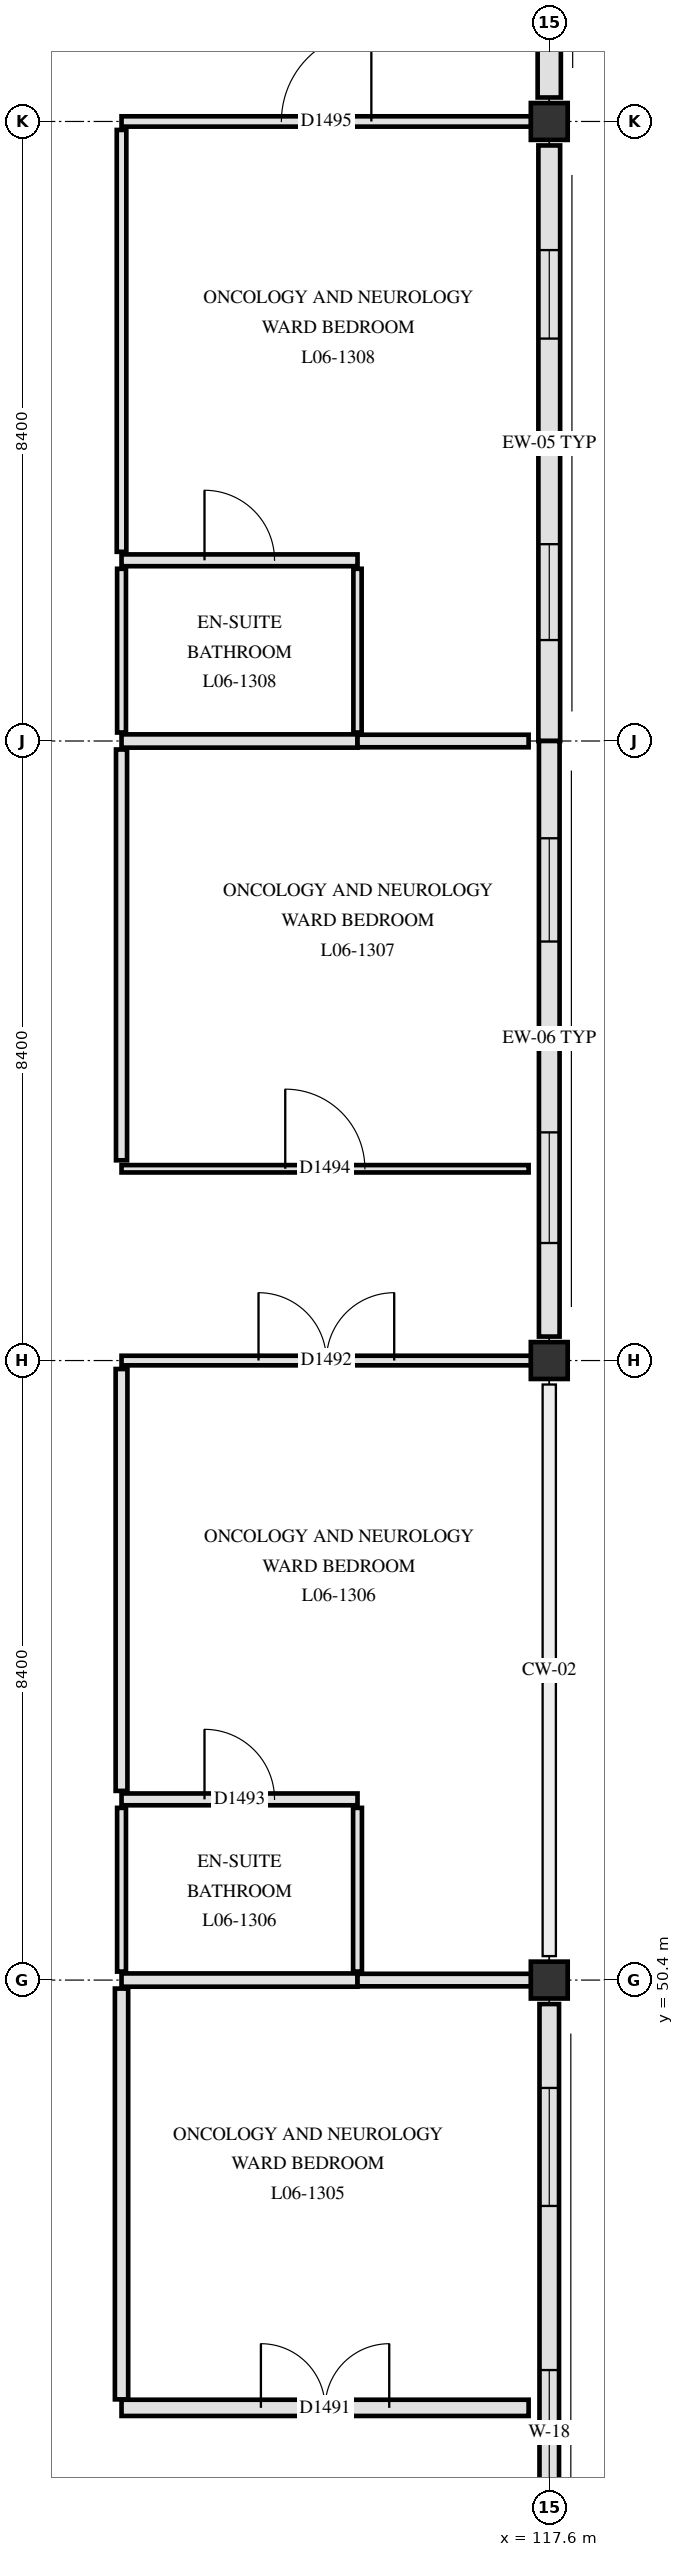
"""IFC4 building model, lengths in metres.
Left out: names, types, materials, properties, quantities, classifications, styles, units other than length and angle.
Written with IfcOpenShell. Run it as: python <this file> out.ifc"""

import sys

from ifc_helpers import new_model, si_unit, direction, frame, frame_2d, origin, origin_2d, place, context, subcontext, project, spatial, rectangle, extrude, element, fill, save


model = new_model("IFC4")
c1 = context("Model", 3, precision=1e-05, world=origin(), true_north=direction((0.0, 1.0)))
c2 = subcontext(c1, "Body", "Model", "MODEL_VIEW")
j1 = project(units=[si_unit("LENGTHUNIT", "METRE"), si_unit("PLANEANGLEUNIT", "RADIAN")], contexts=[c1])
p1 = place(None, origin())
s1 = spatial("IfcSite", under=j1, at=p1, CompositionType="ELEMENT")
p2 = place(p1, origin())
s2 = spatial("IfcBuilding", under=s1, at=p2, CompositionType="ELEMENT")
p3 = place(p2, frame((0.0, 0.0, 26.4)))
s3 = spatial("IfcBuildingStorey", under=s2, at=p3, CompositionType="ELEMENT", Elevation=26.4)
for number, where, z_axis, x_axis in (
    (1, (117.6, 50.4, 0.0), (0.0, 0.0, 1.0), (1.0, 0.0, 0.0)),
    (2, (117.6, 58.8, 0.0), (0.0, 0.0, 1.0), (1.0, 0.0, 0.0)),
    (3, (117.6, 75.6, 0.0), (0.0, 0.0, 1.0), (1.0, 0.0, 0.0)),
):
    element("IfcColumn", number, at=place(p3, frame(where, z_axis=z_axis, x_axis=x_axis)), inside=s3, PredefinedType="COLUMN", context=c2, shape_type="SweptSolid", body=[
        extrude(rectangle(XDim=0.5, YDim=0.5, at=origin_2d()), origin(), (0.0, 0.0, 1.0), 3.9),
    ])
p4 = place(p3, frame((117.6, 83.675, 0.0), z_axis=(0.0, 0.0, 1.0), x_axis=(0.0, -1.0, 0.0)))
e4 = element("IfcWall", 4, at=p4, inside=s3, PredefinedType="SOLIDWALL", context=c2, shape_type="SweptSolid", body=[
    extrude(rectangle(XDim=7.75, YDim=0.315, at=frame_2d((3.875, 0.0))), origin(), (0.0, 0.0, 1.0), 3.34),
])
p5 = place(p4, frame((1.438, 0.0, 0.85)))
e5 = element("IfcOpeningElement", 5, at=p5, cuts=e4, PredefinedType="OPENING", context=c2, shape_type="SweptSolid", body=[
    extrude(rectangle(XDim=1.0, YDim=1.42, at=frame_2d((0.5, 0.71))), frame((0.0, 0.167, 0.0), z_axis=(0.0, -1.0, 0.0), x_axis=(1.0, 0.0, 0.0)), (0.0, 0.0, 1.0), 0.335),
])
p6 = place(p4, frame((5.262, 0.0, 0.85)))
e6 = element("IfcOpeningElement", 6, at=p6, cuts=e4, PredefinedType="OPENING", context=c2, shape_type="SweptSolid", body=[
    extrude(rectangle(XDim=1.1, YDim=1.42, at=frame_2d((0.55, 0.71))), frame((0.0, 0.167, 0.0), z_axis=(0.0, -1.0, 0.0), x_axis=(1.0, 0.0, 0.0)), (0.0, 0.0, 1.0), 0.335),
])
p7 = place(p3, frame((117.6, 75.275, 0.0), z_axis=(0.0, 0.0, 1.0), x_axis=(0.0, -1.0, 0.0)))
e7 = element("IfcWall", 7, at=p7, inside=s3, PredefinedType="SOLIDWALL", context=c2, shape_type="SweptSolid", body=[
    extrude(rectangle(XDim=8.075, YDim=0.295, at=frame_2d((4.038, 0.0))), origin(), (0.0, 0.0, 1.0), 3.11),
])
p8 = place(p7, frame((1.419, 0.0, 0.85)))
e8 = element("IfcOpeningElement", 8, at=p8, cuts=e7, PredefinedType="OPENING", context=c2, shape_type="SweptSolid", body=[
    extrude(rectangle(XDim=1.2, YDim=1.42, at=frame_2d((0.6, 0.71))), frame((0.0, 0.157, 0.0), z_axis=(0.0, -1.0, 0.0), x_axis=(1.0, 0.0, 0.0)), (0.0, 0.0, 1.0), 0.315),
])
p9 = place(p7, frame((5.406, 0.0, 0.85)))
e9 = element("IfcOpeningElement", 9, at=p9, cuts=e7, PredefinedType="OPENING", context=c2, shape_type="SweptSolid", body=[
    extrude(rectangle(XDim=1.3, YDim=1.42, at=frame_2d((0.65, 0.71))), frame((0.0, 0.157, 0.0), z_axis=(0.0, -1.0, 0.0), x_axis=(1.0, 0.0, 0.0)), (0.0, 0.0, 1.0), 0.315),
])
p10 = place(p3, frame((117.6, 67.2, 0.0), z_axis=(0.0, 0.0, 1.0), x_axis=(0.0, -1.0, 0.0)))
e10 = element("IfcWall", 10, at=p10, inside=s3, PredefinedType="SOLIDWALL", context=c2, shape_type="SweptSolid", body=[
    extrude(rectangle(XDim=8.075, YDim=0.28, at=frame_2d((4.038, 0.0))), origin(), (0.0, 0.0, 1.0), 3.11),
])
p11 = place(p10, frame((1.319, 0.0, 0.85)))
e11 = element("IfcOpeningElement", 11, at=p11, cuts=e10, PredefinedType="OPENING", context=c2, shape_type="SweptSolid", body=[
    extrude(rectangle(XDim=1.4, YDim=1.42, at=frame_2d((0.7, 0.71))), frame((0.0, 0.15, 0.0), z_axis=(0.0, -1.0, 0.0), x_axis=(1.0, 0.0, 0.0)), (0.0, 0.0, 1.0), 0.3),
])
p12 = place(p10, frame((5.306, 0.0, 0.85)))
e12 = element("IfcOpeningElement", 12, at=p12, cuts=e10, PredefinedType="OPENING", context=c2, shape_type="SweptSolid", body=[
    extrude(rectangle(XDim=1.5, YDim=1.42, at=frame_2d((0.75, 0.71))), frame((0.0, 0.15, 0.0), z_axis=(0.0, -1.0, 0.0), x_axis=(1.0, 0.0, 0.0)), (0.0, 0.0, 1.0), 0.3),
])
p13 = place(p3, frame((117.6, 50.075, 0.0), z_axis=(0.0, 0.0, 1.0), x_axis=(0.0, -1.0, 0.0)))
e13 = element("IfcWall", 13, at=p13, inside=s3, PredefinedType="SOLIDWALL", context=c2, shape_type="SweptSolid", body=[
    extrude(rectangle(XDim=7.75, YDim=0.265, at=frame_2d((3.875, 0.0))), origin(), (0.0, 0.0, 1.0), 3.38),
])
p14 = place(p13, frame((1.137, 0.0, 0.85)))
e14 = element("IfcOpeningElement", 14, at=p14, cuts=e13, PredefinedType="OPENING", context=c2, shape_type="SweptSolid", body=[
    extrude(rectangle(XDim=1.6, YDim=1.42, at=frame_2d((0.8, 0.71))), frame((0.0, 0.142, 0.0), z_axis=(0.0, -1.0, 0.0), x_axis=(1.0, 0.0, 0.0)), (0.0, 0.0, 1.0), 0.285),
])
p15 = place(p13, frame((4.962, 0.0, 0.85)))
e15 = element("IfcOpeningElement", 15, at=p15, cuts=e13, PredefinedType="OPENING", context=c2, shape_type="SweptSolid", body=[
    extrude(rectangle(XDim=1.7, YDim=1.42, at=frame_2d((0.85, 0.71))), frame((0.0, 0.142, 0.0), z_axis=(0.0, -1.0, 0.0), x_axis=(1.0, 0.0, 0.0)), (0.0, 0.0, 1.0), 0.285),
])
p16 = place(p3, frame((111.8, 44.6, 0.0), z_axis=(0.0, 0.0, 1.0), x_axis=(1.0, 0.0, 0.0)))
e16 = element("IfcWall", 16, at=p16, inside=s3, PredefinedType="PARTITIONING", context=c2, shape_type="SweptSolid", body=[
    extrude(rectangle(XDim=5.52, YDim=0.22, at=frame_2d((2.76, 0.0))), origin(), (0.0, 0.0, 1.0), 3.34),
])
p17 = place(p16, frame((1.89, 0.0, 0.0)))
e17 = element("IfcOpeningElement", 17, at=p17, cuts=e16, PredefinedType="OPENING", context=c2, shape_type="SweptSolid", body=[
    extrude(rectangle(XDim=1.74, YDim=2.24, at=frame_2d((0.87, 1.12))), frame((0.0, 0.12, 0.0), z_axis=(0.0, -1.0, 0.0), x_axis=(1.0, 0.0, 0.0)), (0.0, 0.0, 1.0), 0.24),
])
p18 = place(p3, frame((111.8, 50.4, 0.0), z_axis=(0.0, 0.0, 1.0), x_axis=(1.0, 0.0, 0.0)))
e18 = element("IfcWall", 18, at=p18, inside=s3, PredefinedType="PARTITIONING", context=c2, shape_type="SweptSolid", body=[
    extrude(rectangle(XDim=3.2, YDim=0.18, at=frame_2d((1.6, 0.0))), origin(), (0.0, 0.0, 1.0), 3.21),
])
p19 = place(p3, frame((115.0, 50.4, 0.0), z_axis=(0.0, 0.0, 1.0), x_axis=(1.0, 0.0, 0.0)))
e19 = element("IfcWall", 19, at=p19, inside=s3, PredefinedType="PARTITIONING", context=c2, shape_type="SweptSolid", body=[
    extrude(rectangle(XDim=2.355, YDim=0.17, at=frame_2d((1.177, 0.0))), origin(), (0.0, 0.0, 1.0), 3.21),
])
p20 = place(p3, frame((111.8, 52.85, 0.0), z_axis=(0.0, 0.0, 1.0), x_axis=(1.0, 0.0, 0.0)))
e20 = element("IfcWall", 20, at=p20, inside=s3, PredefinedType="PARTITIONING", context=c2, shape_type="SweptSolid", body=[
    extrude(rectangle(XDim=3.2, YDim=0.16, at=frame_2d((1.6, 0.0))), origin(), (0.0, 0.0, 1.0), 3.61),
])
p21 = place(p20, frame((1.125, 0.0, 0.0)))
e21 = element("IfcOpeningElement", 21, at=p21, cuts=e20, PredefinedType="OPENING", context=c2, shape_type="SweptSolid", body=[
    extrude(rectangle(XDim=0.95, YDim=2.1, at=frame_2d((0.475, 1.05))), frame((0.0, 0.09, 0.0), z_axis=(0.0, -1.0, 0.0), x_axis=(1.0, 0.0, 0.0)), (0.0, 0.0, 1.0), 0.18),
])
p22 = place(p3, frame((111.8, 58.8, 0.0), z_axis=(0.0, 0.0, 1.0), x_axis=(1.0, 0.0, 0.0)))
e22 = element("IfcWall", 22, at=p22, inside=s3, PredefinedType="PARTITIONING", context=c2, shape_type="SweptSolid", body=[
    extrude(rectangle(XDim=5.555, YDim=0.13, at=frame_2d((2.777, 0.0))), origin(), (0.0, 0.0, 1.0), 3.21),
])
p23 = place(p22, frame((1.857, 0.0, 0.0)))
e23 = element("IfcOpeningElement", 23, at=p23, cuts=e22, PredefinedType="OPENING", context=c2, shape_type="SweptSolid", body=[
    extrude(rectangle(XDim=1.84, YDim=2.28, at=frame_2d((0.92, 1.14))), frame((0.0, 0.075, 0.0), z_axis=(0.0, -1.0, 0.0), x_axis=(1.0, 0.0, 0.0)), (0.0, 0.0, 1.0), 0.15),
])
p24 = place(p3, frame((111.8, 61.4, 0.0), z_axis=(0.0, 0.0, 1.0), x_axis=(1.0, 0.0, 0.0)))
e24 = element("IfcWall", 24, at=p24, inside=s3, PredefinedType="PARTITIONING", context=c2, shape_type="SweptSolid", body=[
    extrude(rectangle(XDim=5.52, YDim=0.1, at=frame_2d((2.76, 0.0))), origin(), (0.0, 0.0, 1.0), 3.61),
])
p25 = place(p24, frame((2.22, 0.0, 0.0)))
e25 = element("IfcOpeningElement", 25, at=p25, cuts=e24, PredefinedType="OPENING", context=c2, shape_type="SweptSolid", body=[
    extrude(rectangle(XDim=1.08, YDim=2.12, at=frame_2d((0.54, 1.06))), frame((0.0, 0.06, 0.0), z_axis=(0.0, -1.0, 0.0), x_axis=(1.0, 0.0, 0.0)), (0.0, 0.0, 1.0), 0.12),
])
p26 = place(p3, frame((111.8, 67.2, 0.0), z_axis=(0.0, 0.0, 1.0), x_axis=(1.0, 0.0, 0.0)))
e26 = element("IfcWall", 26, at=p26, inside=s3, PredefinedType="PARTITIONING", context=c2, shape_type="SweptSolid", body=[
    extrude(rectangle(XDim=3.2, YDim=0.18, at=frame_2d((1.6, 0.0))), origin(), (0.0, 0.0, 1.0), 3.61),
])
p27 = place(p3, frame((115.0, 67.2, 0.0), z_axis=(0.0, 0.0, 1.0), x_axis=(1.0, 0.0, 0.0)))
e27 = element("IfcWall", 27, at=p27, inside=s3, PredefinedType="PARTITIONING", context=c2, shape_type="SweptSolid", body=[
    extrude(rectangle(XDim=2.32, YDim=0.17, at=frame_2d((1.16, 0.0))), origin(), (0.0, 0.0, 1.0), 3.61),
])
p28 = place(p3, frame((111.8, 69.65, 0.0), z_axis=(0.0, 0.0, 1.0), x_axis=(1.0, 0.0, 0.0)))
e28 = element("IfcWall", 28, at=p28, inside=s3, PredefinedType="PARTITIONING", context=c2, shape_type="SweptSolid", body=[
    extrude(rectangle(XDim=3.2, YDim=0.16, at=frame_2d((1.6, 0.0))), origin(), (0.0, 0.0, 1.0), 3.61),
])
p29 = place(p28, frame((1.125, 0.0, 0.0)))
e29 = element("IfcOpeningElement", 29, at=p29, cuts=e28, PredefinedType="OPENING", context=c2, shape_type="SweptSolid", body=[
    extrude(rectangle(XDim=0.95, YDim=2.1, at=frame_2d((0.475, 1.05))), frame((0.0, 0.09, 0.0), z_axis=(0.0, -1.0, 0.0), x_axis=(1.0, 0.0, 0.0)), (0.0, 0.0, 1.0), 0.18),
])
p30 = place(p3, frame((111.8, 75.6, 0.0), z_axis=(0.0, 0.0, 1.0), x_axis=(1.0, 0.0, 0.0)))
e30 = element("IfcWall", 30, at=p30, inside=s3, PredefinedType="PARTITIONING", context=c2, shape_type="SweptSolid", body=[
    extrude(rectangle(XDim=5.555, YDim=0.14, at=frame_2d((2.777, 0.0))), origin(), (0.0, 0.0, 1.0), 3.21),
])
p31 = place(p30, frame((2.167, 0.0, 0.0)))
e31 = element("IfcOpeningElement", 31, at=p31, cuts=e30, PredefinedType="OPENING", context=c2, shape_type="SweptSolid", body=[
    extrude(rectangle(XDim=1.22, YDim=2.18, at=frame_2d((0.61, 1.09))), frame((0.0, 0.08, 0.0), z_axis=(0.0, -1.0, 0.0), x_axis=(1.0, 0.0, 0.0)), (0.0, 0.0, 1.0), 0.16),
])
p32 = place(p3, frame((111.8, 44.715, 0.0), z_axis=(0.0, 0.0, 1.0), x_axis=(0.0, 1.0, 0.0)))
e32 = element("IfcWall", 32, at=p32, inside=s3, PredefinedType="PARTITIONING", context=c2, shape_type="SweptSolid", body=[
    extrude(rectangle(XDim=5.57, YDim=0.18, at=frame_2d((2.785, 0.0))), origin(), (0.0, 0.0, 1.0), 3.34),
])
p33 = place(p3, frame((111.8, 50.515, 0.0), z_axis=(0.0, 0.0, 1.0), x_axis=(0.0, 1.0, 0.0)))
e33 = element("IfcWall", 33, at=p33, inside=s3, PredefinedType="PARTITIONING", context=c2, shape_type="SweptSolid", body=[
    extrude(rectangle(XDim=2.22, YDim=0.12, at=frame_2d((1.11, 0.0))), origin(), (0.0, 0.0, 1.0), 3.61),
])
p34 = place(p3, frame((111.8, 52.965, 0.0), z_axis=(0.0, 0.0, 1.0), x_axis=(0.0, 1.0, 0.0)))
e34 = element("IfcWall", 34, at=p34, inside=s3, PredefinedType="PARTITIONING", context=c2, shape_type="SweptSolid", body=[
    extrude(rectangle(XDim=5.72, YDim=0.16, at=frame_2d((2.86, 0.0))), origin(), (0.0, 0.0, 1.0), 3.34),
])
p35 = place(p3, frame((111.8, 61.515, 0.0), z_axis=(0.0, 0.0, 1.0), x_axis=(0.0, 1.0, 0.0)))
e35 = element("IfcWall", 35, at=p35, inside=s3, PredefinedType="PARTITIONING", context=c2, shape_type="SweptSolid", body=[
    extrude(rectangle(XDim=5.57, YDim=0.15, at=frame_2d((2.785, 0.0))), origin(), (0.0, 0.0, 1.0), 3.34),
])
p36 = place(p3, frame((111.8, 67.315, 0.0), z_axis=(0.0, 0.0, 1.0), x_axis=(0.0, 1.0, 0.0)))
e36 = element("IfcWall", 36, at=p36, inside=s3, PredefinedType="PARTITIONING", context=c2, shape_type="SweptSolid", body=[
    extrude(rectangle(XDim=2.22, YDim=0.12, at=frame_2d((1.11, 0.0))), origin(), (0.0, 0.0, 1.0), 3.61),
])
p37 = place(p3, frame((111.8, 69.765, 0.0), z_axis=(0.0, 0.0, 1.0), x_axis=(0.0, 1.0, 0.0)))
e37 = element("IfcWall", 37, at=p37, inside=s3, PredefinedType="PARTITIONING", context=c2, shape_type="SweptSolid", body=[
    extrude(rectangle(XDim=5.72, YDim=0.13, at=frame_2d((2.86, 0.0))), origin(), (0.0, 0.0, 1.0), 3.34),
])
p38 = place(p3, frame((115.0, 50.515, 0.0), z_axis=(0.0, 0.0, 1.0), x_axis=(0.0, 1.0, 0.0)))
e38 = element("IfcWall", 38, at=p38, inside=s3, PredefinedType="PARTITIONING", context=c2, shape_type="SweptSolid", body=[
    extrude(rectangle(XDim=2.22, YDim=0.12, at=frame_2d((1.11, 0.0))), origin(), (0.0, 0.0, 1.0), 3.61),
])
p39 = place(p3, frame((115.0, 67.315, 0.0), z_axis=(0.0, 0.0, 1.0), x_axis=(0.0, 1.0, 0.0)))
e39 = element("IfcWall", 39, at=p39, inside=s3, PredefinedType="PARTITIONING", context=c2, shape_type="SweptSolid", body=[
    extrude(rectangle(XDim=2.22, YDim=0.112, at=frame_2d((1.11, 0.0))), origin(), (0.0, 0.0, 1.0), 3.61),
])
p40 = place(p8, origin())
e40 = element("IfcWindow", 40, at=p40, inside=s3, PartitioningType="SINGLE_PANEL", PredefinedType="WINDOW", context=c2, shape_type="SweptSolid", body=[
    extrude(rectangle(XDim=1.2, YDim=1.42, at=frame_2d((0.6, 0.71))), frame((0.0, 0.03, 0.0), z_axis=(0.0, -1.0, 0.0), x_axis=(1.0, 0.0, 0.0)), (0.0, 0.0, 1.0), 0.06),
])
fill(e8, e40)
p41 = place(p9, origin())
e41 = element("IfcWindow", 41, at=p41, inside=s3, PartitioningType="SINGLE_PANEL", PredefinedType="WINDOW", context=c2, shape_type="SweptSolid", body=[
    extrude(rectangle(XDim=1.3, YDim=1.42, at=frame_2d((0.65, 0.71))), frame((0.0, 0.03, 0.0), z_axis=(0.0, -1.0, 0.0), x_axis=(1.0, 0.0, 0.0)), (0.0, 0.0, 1.0), 0.06),
])
fill(e9, e41)
p42 = place(p11, origin())
e42 = element("IfcWindow", 42, at=p42, inside=s3, PartitioningType="SINGLE_PANEL", PredefinedType="WINDOW", context=c2, shape_type="SweptSolid", body=[
    extrude(rectangle(XDim=1.4, YDim=1.42, at=frame_2d((0.7, 0.71))), frame((0.0, 0.03, 0.0), z_axis=(0.0, -1.0, 0.0), x_axis=(1.0, 0.0, 0.0)), (0.0, 0.0, 1.0), 0.06),
])
fill(e11, e42)
p43 = place(p12, origin())
e43 = element("IfcWindow", 43, at=p43, inside=s3, PartitioningType="SINGLE_PANEL", PredefinedType="WINDOW", context=c2, shape_type="SweptSolid", body=[
    extrude(rectangle(XDim=1.5, YDim=1.42, at=frame_2d((0.75, 0.71))), frame((0.0, 0.03, 0.0), z_axis=(0.0, -1.0, 0.0), x_axis=(1.0, 0.0, 0.0)), (0.0, 0.0, 1.0), 0.06),
])
fill(e12, e43)
p44 = place(p14, origin())
e44 = element("IfcWindow", 44, at=p44, inside=s3, PartitioningType="SINGLE_PANEL", PredefinedType="WINDOW", context=c2, shape_type="SweptSolid", body=[
    extrude(rectangle(XDim=1.6, YDim=1.42, at=frame_2d((0.8, 0.71))), frame((0.0, 0.03, 0.0), z_axis=(0.0, -1.0, 0.0), x_axis=(1.0, 0.0, 0.0)), (0.0, 0.0, 1.0), 0.06),
])
fill(e14, e44)
p45 = place(p15, origin())
e45 = element("IfcWindow", 45, at=p45, inside=s3, PartitioningType="SINGLE_PANEL", PredefinedType="WINDOW", context=c2, shape_type="SweptSolid", body=[
    extrude(rectangle(XDim=1.7, YDim=1.42, at=frame_2d((0.85, 0.71))), frame((0.0, 0.03, 0.0), z_axis=(0.0, -1.0, 0.0), x_axis=(1.0, 0.0, 0.0)), (0.0, 0.0, 1.0), 0.06),
])
fill(e15, e45)
p46 = place(p17, origin())
e46 = element("IfcDoor", 46, at=p46, inside=s3, OperationType="DOUBLE_SWING_RIGHT", PredefinedType="DOOR", context=c2, shape_type="SweptSolid", body=[
    extrude(rectangle(XDim=1.74, YDim=2.24, at=frame_2d((0.87, 1.12))), frame((0.0, 0.025, 0.0), z_axis=(0.0, -1.0, 0.0), x_axis=(1.0, 0.0, 0.0)), (0.0, 0.0, 1.0), 0.05),
])
fill(e17, e46)
p47 = place(p23, origin())
e47 = element("IfcDoor", 47, at=p47, inside=s3, OperationType="DOUBLE_SWING_LEFT", PredefinedType="DOOR", context=c2, shape_type="SweptSolid", body=[
    extrude(rectangle(XDim=1.84, YDim=2.28, at=frame_2d((0.92, 1.14))), frame((0.0, 0.025, 0.0), z_axis=(0.0, -1.0, 0.0), x_axis=(1.0, 0.0, 0.0)), (0.0, 0.0, 1.0), 0.05),
])
fill(e23, e47)
p48 = place(p21, origin())
e48 = element("IfcDoor", 48, at=p48, inside=s3, OperationType="SINGLE_SWING_LEFT", PredefinedType="DOOR", context=c2, shape_type="SweptSolid", body=[
    extrude(rectangle(XDim=0.95, YDim=2.1, at=frame_2d((0.475, 1.05))), frame((0.0, 0.025, 0.0), z_axis=(0.0, -1.0, 0.0), x_axis=(1.0, 0.0, 0.0)), (0.0, 0.0, 1.0), 0.05),
])
fill(e21, e48)
p49 = place(p25, origin())
e49 = element("IfcDoor", 49, at=p49, inside=s3, OperationType="SINGLE_SWING_LEFT", PredefinedType="DOOR", context=c2, shape_type="SweptSolid", body=[
    extrude(rectangle(XDim=1.08, YDim=2.12, at=frame_2d((0.54, 1.06))), frame((0.0, 0.025, 0.0), z_axis=(0.0, -1.0, 0.0), x_axis=(1.0, 0.0, 0.0)), (0.0, 0.0, 1.0), 0.05),
])
fill(e25, e49)
p50 = place(p31, origin())
e50 = element("IfcDoor", 50, at=p50, inside=s3, OperationType="SINGLE_SWING_RIGHT", PredefinedType="DOOR", context=c2, shape_type="SweptSolid", body=[
    extrude(rectangle(XDim=1.22, YDim=2.18, at=frame_2d((0.61, 1.09))), frame((0.0, 0.025, 0.0), z_axis=(0.0, -1.0, 0.0), x_axis=(1.0, 0.0, 0.0)), (0.0, 0.0, 1.0), 0.05),
])
fill(e31, e50)
p51 = place(p29, origin())
e51 = element("IfcDoor", 51, at=p51, inside=s3, OperationType="SINGLE_SWING_LEFT", PredefinedType="DOOR", context=c2, shape_type="SweptSolid", body=[
    extrude(rectangle(XDim=0.95, YDim=2.1, at=frame_2d((0.475, 1.05))), frame((0.0, 0.025, 0.0), z_axis=(0.0, -1.0, 0.0), x_axis=(1.0, 0.0, 0.0)), (0.0, 0.0, 1.0), 0.05),
])
fill(e29, e51)
save(model, sys.argv[1])
